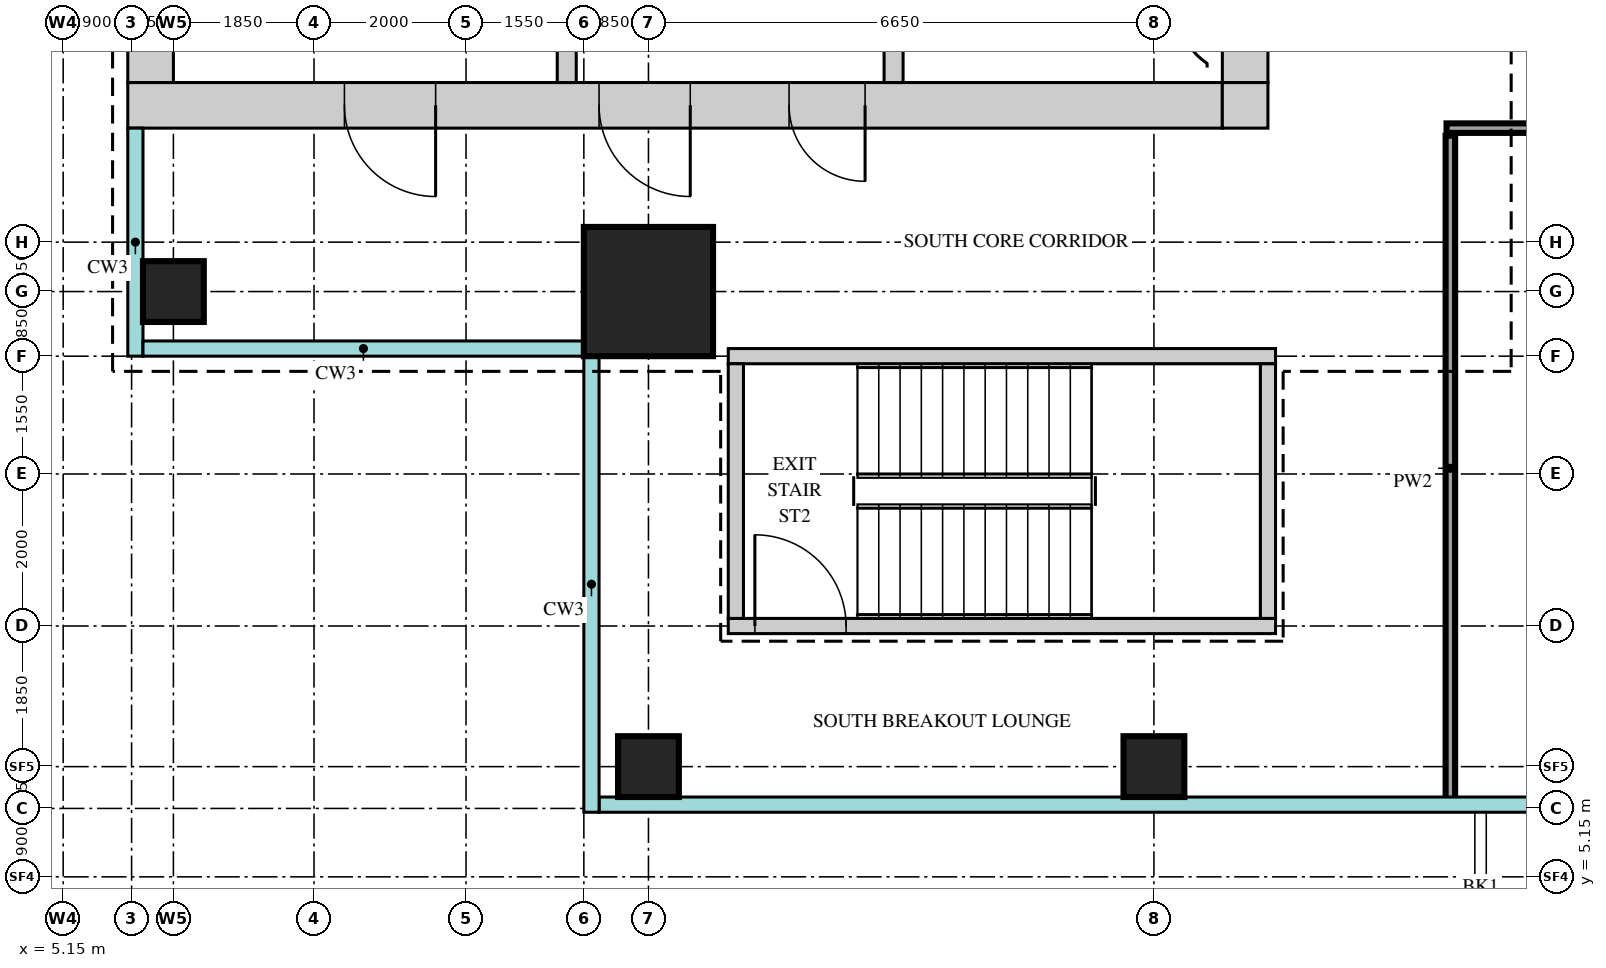
"""IFC4 building model, lengths in metres.
Left out: names, types, materials, properties, quantities, classifications, styles, units other than length and angle.
Written with IfcOpenShell. Run it as: python <this file> out.ifc"""

import sys

from ifc_helpers import new_model, si_unit, direction, frame, frame_2d, origin, origin_2d, place, context, subcontext, project, spatial, rectangle, extrude, source, transform, mapped, element, fill, save


model = new_model("IFC4")
c1 = context("Model", 3, precision=1e-05, world=origin(), true_north=direction((0.0, 1.0)))
c2 = subcontext(c1, "Body", "Model", "MODEL_VIEW")
j1 = project(units=[si_unit("LENGTHUNIT", "METRE"), si_unit("PLANEANGLEUNIT", "RADIAN")], contexts=[c1])
p1 = place(None, origin())
s1 = spatial("IfcSite", under=j1, at=p1, CompositionType="ELEMENT")
p2 = place(p1, origin())
s2 = spatial("IfcBuilding", under=s1, at=p2, CompositionType="ELEMENT")
p3 = place(p2, frame((0.0, 0.0, 302.2)))
s3 = spatial("IfcBuildingStorey", under=s2, at=p3, CompositionType="ELEMENT", Elevation=302.2)
m1 = source(origin(), c2, "Body", "SweptSolid", [
    extrude(rectangle(XDim=14.4, YDim=0.6, at=frame_2d((7.2, 0.0))), origin(), (0.0, 0.0, 1.0), 3.75),
])
p4 = place(p3, frame((6.0, 15.3, 0.0), z_axis=(0.0, 0.0, 1.0), x_axis=(1.0, 0.0, 0.0)))
e1 = element("IfcWall", 1, at=p4, inside=s3, PredefinedType="SHEAR", context=c2, shape_type="MappedRepresentation", body=[
    mapped(m1, transform((0.0, 0.0, 0.0))),
])
m2 = source(origin(), c2, "Body", "SweptSolid", [
    extrude(rectangle(XDim=1.2, YDim=2.1, at=frame_2d((0.6, 1.05))), frame((0.0, 0.31, 0.0), z_axis=(0.0, -1.0, 0.0), x_axis=(1.0, 0.0, 0.0)), (0.0, 0.0, 1.0), 0.62),
])
p5 = place(p4, frame((6.2, 0.0, 0.0)))
e2 = element("IfcOpeningElement", 2, at=p5, cuts=e1, PredefinedType="OPENING", context=c2, shape_type="MappedRepresentation", body=[
    mapped(m2, transform((0.0, 0.0, 0.0))),
])
p6 = place(p4, frame((2.85, 0.0, 0.0)))
e3 = element("IfcOpeningElement", 3, at=p6, cuts=e1, PredefinedType="OPENING", context=c2, shape_type="MappedRepresentation", body=[
    mapped(m2, transform((0.0, 0.0, 0.0))),
])
m3 = source(origin(), c2, "Body", "SweptSolid", [
    extrude(rectangle(XDim=1.0, YDim=2.1, at=frame_2d((0.5, 1.05))), frame((0.0, 0.31, 0.0), z_axis=(0.0, -1.0, 0.0), x_axis=(1.0, 0.0, 0.0)), (0.0, 0.0, 1.0), 0.62),
])
p7 = place(p4, frame((8.7, 0.0, 0.0)))
e4 = element("IfcOpeningElement", 4, at=p7, cuts=e1, PredefinedType="OPENING", context=c2, shape_type="MappedRepresentation", body=[
    mapped(m3, transform((0.0, 0.0, 0.0))),
])
m4 = source(origin(), c2, "Body", "SweptSolid", [
    extrude(rectangle(XDim=0.6, YDim=0.6, at=frame_2d((0.3, 0.0))), origin(), (0.0, 0.0, 1.0), 3.75),
])
p8 = place(p3, frame((20.4, 15.3, 0.0), z_axis=(0.0, 0.0, 1.0), x_axis=(1.0, 0.0, 0.0)))
e5 = element("IfcWall", 5, at=p8, inside=s3, PredefinedType="SHEAR", context=c2, shape_type="MappedRepresentation", body=[
    mapped(m4, transform((0.0, 0.0, 0.0))),
])
m5 = source(origin(), c2, "Body", "SweptSolid", [
    extrude(rectangle(XDim=22.8, YDim=0.6, at=frame_2d((11.4, 0.0))), origin(), (0.0, 0.0, 1.0), 3.75),
])
p9 = place(p3, frame((20.7, 15.6, 0.0), z_axis=(0.0, 0.0, 1.0), x_axis=(0.0, 1.0, 0.0)))
e6 = element("IfcWall", 6, at=p9, inside=s3, PredefinedType="SHEAR", context=c2, shape_type="MappedRepresentation", body=[
    mapped(m5, transform((0.0, 0.0, 0.0))),
])
m6 = source(origin(), c2, "Body", "SweptSolid", [
    extrude(rectangle(XDim=1.8, YDim=2.1, at=frame_2d((0.9, 1.05))), frame((0.0, 0.31, 0.0), z_axis=(0.0, -1.0, 0.0), x_axis=(1.0, 0.0, 0.0)), (0.0, 0.0, 1.0), 0.62),
])
p10 = place(p9, frame((10.9, 0.0, 0.0)))
e7 = element("IfcOpeningElement", 7, at=p10, cuts=e6, PredefinedType="OPENING", context=c2, shape_type="MappedRepresentation", body=[
    mapped(m6, transform((0.0, 0.0, 0.0))),
])
m7 = source(origin(), c2, "Body", "SweptSolid", [
    extrude(rectangle(XDim=0.9, YDim=2.1, at=frame_2d((0.45, 1.05))), frame((0.0, 0.31, 0.0), z_axis=(0.0, -1.0, 0.0), x_axis=(1.0, 0.0, 0.0)), (0.0, 0.0, 1.0), 0.62),
])
p11 = place(p9, frame((0.55, 0.0, 0.0)))
e8 = element("IfcOpeningElement", 8, at=p11, cuts=e6, PredefinedType="OPENING", context=c2, shape_type="MappedRepresentation", body=[
    mapped(m7, transform((0.0, 0.0, 0.0))),
])
p12 = place(p9, frame((4.1, 0.0, 0.0)))
e9 = element("IfcOpeningElement", 9, at=p12, cuts=e6, PredefinedType="OPENING", context=c2, shape_type="MappedRepresentation", body=[
    mapped(m7, transform((0.0, 0.0, 0.0))),
])
p13 = place(p3, frame((6.3, 15.6, 0.0), z_axis=(0.0, 0.0, 1.0), x_axis=(0.0, 1.0, 0.0)))
e10 = element("IfcWall", 10, at=p13, inside=s3, PredefinedType="SHEAR", context=c2, shape_type="MappedRepresentation", body=[
    mapped(m5, transform((0.0, 0.0, 0.0))),
])
m8 = source(origin(), c2, "Body", "SweptSolid", [
    extrude(rectangle(XDim=7.2, YDim=0.2, at=frame_2d((3.6, 0.0))), origin(), (0.0, 0.0, 1.0), 3.75),
])
p14 = place(p3, frame((13.9, 12.0, 0.0), z_axis=(0.0, 0.0, 1.0), x_axis=(1.0, 0.0, 0.0)))
e11 = element("IfcWall", 11, at=p14, inside=s3, PredefinedType="SHEAR", context=c2, shape_type="MappedRepresentation", body=[
    mapped(m8, transform((0.0, 0.0, 0.0))),
])
p15 = place(p3, frame((13.9, 8.45, 0.0), z_axis=(0.0, 0.0, 1.0), x_axis=(1.0, 0.0, 0.0)))
e12 = element("IfcWall", 12, at=p15, inside=s3, PredefinedType="SHEAR", context=c2, shape_type="MappedRepresentation", body=[
    mapped(m8, transform((0.0, 0.0, 0.0))),
])
m9 = source(origin(), c2, "Body", "SweptSolid", [
    extrude(rectangle(XDim=1.2, YDim=2.1, at=frame_2d((0.6, 1.05))), frame((0.0, 0.11, 0.0), z_axis=(0.0, -1.0, 0.0), x_axis=(1.0, 0.0, 0.0)), (0.0, 0.0, 1.0), 0.22),
])
p16 = place(p15, frame((0.35, 0.0, 0.0)))
e13 = element("IfcOpeningElement", 13, at=p16, cuts=e12, PredefinedType="OPENING", context=c2, shape_type="MappedRepresentation", body=[
    mapped(m9, transform((0.0, 0.0, 0.0))),
])
m10 = source(origin(), c2, "Body", "SweptSolid", [
    extrude(rectangle(XDim=3.35, YDim=0.2, at=frame_2d((1.675, 0.0))), origin(), (0.0, 0.0, 1.0), 3.75),
])
for number, where, z_axis, x_axis in (
    (14, (21.0, 8.55, 0.0), (0.0, 0.0, 1.0), (0.0, 1.0, 0.0)),
    (15, (14.0, 8.55, 0.0), (0.0, 0.0, 1.0), (0.0, 1.0, 0.0)),
):
    element("IfcWall", number, at=place(p3, frame(where, z_axis=z_axis, x_axis=x_axis)), inside=s3, PredefinedType="SHEAR", context=c2, shape_type="MappedRepresentation", body=[
        mapped(m10, transform((0.0, 0.0, 0.0))),
    ])
m11 = source(origin(), c2, "Body", "SweptSolid", [
    extrude(rectangle(XDim=3.6, YDim=0.25, at=frame_2d((1.8, 0.0))), origin(), (0.0, 0.0, 1.0), 3.75),
])
for number, where, z_axis, x_axis in (
    (16, (16.075, 15.6, 0.0), (0.0, 0.0, 1.0), (0.0, 1.0, 0.0)),
    (17, (11.775, 15.6, 0.0), (0.0, 0.0, 1.0), (0.0, 1.0, 0.0)),
):
    element("IfcWall", number, at=place(p3, frame(where, z_axis=z_axis, x_axis=x_axis)), inside=s3, PredefinedType="STANDARD", context=c2, shape_type="MappedRepresentation", body=[
        mapped(m11, transform((0.0, 0.0, 0.0))),
    ])
m12 = source(origin(), c2, "Body", "SweptSolid", [
    extrude(rectangle(XDim=1.7, YDim=1.7, at=origin_2d()), origin(), (0.0, 0.0, 1.0), 3.75),
])
p17 = place(p3, frame((12.85, 12.85, 0.0), z_axis=(0.0, 0.0, 1.0), x_axis=(1.0, 0.0, 0.0)))
e18 = element("IfcColumn", 18, at=p17, inside=s3, PredefinedType="COLUMN", context=c2, shape_type="MappedRepresentation", body=[
    mapped(m12, transform((0.0, 0.0, 0.0))),
])
m13 = source(origin(), c2, "Body", "SweptSolid", [
    extrude(rectangle(XDim=0.8, YDim=0.8, at=origin_2d()), origin(), (0.0, 0.0, 1.0), 3.75),
])
for number, where, z_axis, x_axis in (
    (19, (12.85, 6.6, 0.0), (0.0, 0.0, 1.0), (1.0, 0.0, 0.0)),
    (20, (19.5, 6.6, 0.0), (0.0, 0.0, 1.0), (1.0, 0.0, 0.0)),
    (21, (6.6, 12.85, 0.0), (0.0, 0.0, 1.0), (1.0, 0.0, 0.0)),
):
    element("IfcColumn", number, at=place(p3, frame(where, z_axis=z_axis, x_axis=x_axis)), inside=s3, PredefinedType="COLUMN", context=c2, shape_type="MappedRepresentation", body=[
        mapped(m13, transform((0.0, 0.0, 0.0))),
    ])
m14 = source(origin(), c2, "Body", "SweptSolid", [
    extrude(rectangle(XDim=8.75, YDim=0.125, at=frame_2d((4.375, 0.0))), origin(), (0.0, 0.0, 1.0), 3.8),
])
p18 = place(p3, frame((23.4, 6.15, 0.0), z_axis=(0.0, 0.0, 1.0), x_axis=(0.0, 1.0, 0.0)))
e22 = element("IfcWall", 22, at=p18, inside=s3, PredefinedType="PARTITIONING", context=c2, shape_type="MappedRepresentation", body=[
    mapped(m14, transform((0.0, 0.0, 0.0))),
])
m15 = source(origin(), c2, "Body", "SweptSolid", [
    extrude(rectangle(XDim=19.1, YDim=0.125, at=frame_2d((9.55, 0.0))), origin(), (0.0, 0.0, 1.0), 3.8),
])
p19 = place(p3, frame((23.35, 15.0, 0.0), z_axis=(0.0, 0.0, 1.0), x_axis=(1.0, 0.0, 0.0)))
e23 = element("IfcWall", 23, at=p19, inside=s3, PredefinedType="PARTITIONING", context=c2, shape_type="MappedRepresentation", body=[
    mapped(m15, transform((0.0, 0.0, 0.0))),
])
m16 = source(origin(), c2, "Body", "SweptSolid", [
    extrude(rectangle(XDim=0.9, YDim=2.1, at=frame_2d((0.45, 1.05))), frame((0.0, 0.073, 0.0), z_axis=(0.0, -1.0, 0.0), x_axis=(1.0, 0.0, 0.0)), (0.0, 0.0, 1.0), 0.145),
])
p20 = place(p19, frame((5.3, 0.0, 0.0)))
e24 = element("IfcOpeningElement", 24, at=p20, cuts=e23, PredefinedType="OPENING", context=c2, shape_type="MappedRepresentation", body=[
    mapped(m16, transform((0.0, 0.0, 0.0))),
])
p21 = place(p19, frame((13.3, 0.0, 0.0)))
e25 = element("IfcOpeningElement", 25, at=p21, cuts=e23, PredefinedType="OPENING", context=c2, shape_type="MappedRepresentation", body=[
    mapped(m16, transform((0.0, 0.0, 0.0))),
])
p22 = place(p19, frame((17.95, 0.0, 0.0)))
e26 = element("IfcOpeningElement", 26, at=p22, cuts=e23, PredefinedType="OPENING", context=c2, shape_type="MappedRepresentation", body=[
    mapped(m16, transform((0.0, 0.0, 0.0))),
])
m17 = source(origin(), c2, "Body", "SweptSolid", [
    extrude(rectangle(XDim=1.2, YDim=2.1, at=frame_2d((0.6, 1.05))), frame((0.0, 0.25, 0.0), z_axis=(0.0, -1.0, 0.0), x_axis=(1.0, 0.0, 0.0)), (0.0, 0.0, 1.0), 0.5),
])
p23 = place(p5, origin())
e27 = element("IfcDoor", 27, at=p23, inside=s3, OperationType="SINGLE_SWING_RIGHT", PredefinedType="DOOR", context=c2, shape_type="MappedRepresentation", body=[
    mapped(m17, transform((0.0, 0.0, 0.0))),
])
fill(e2, e27)
p24 = place(p6, origin())
e28 = element("IfcDoor", 28, at=p24, inside=s3, OperationType="SINGLE_SWING_RIGHT", PredefinedType="DOOR", context=c2, shape_type="MappedRepresentation", body=[
    mapped(m17, transform((0.0, 0.0, 0.0))),
])
fill(e3, e28)
m18 = source(origin(), c2, "Body", "SweptSolid", [
    extrude(rectangle(XDim=1.0, YDim=2.1, at=frame_2d((0.5, 1.05))), frame((0.0, 0.25, 0.0), z_axis=(0.0, -1.0, 0.0), x_axis=(1.0, 0.0, 0.0)), (0.0, 0.0, 1.0), 0.5),
])
p25 = place(p7, origin())
e29 = element("IfcDoor", 29, at=p25, inside=s3, OperationType="SINGLE_SWING_RIGHT", PredefinedType="DOOR", context=c2, shape_type="MappedRepresentation", body=[
    mapped(m18, transform((0.0, 0.0, 0.0))),
])
fill(e4, e29)
m19 = source(origin(), c2, "Body", "SweptSolid", [
    extrude(rectangle(XDim=1.2, YDim=2.1, at=frame_2d((0.6, 1.05))), frame((0.0, 0.025, 0.0), z_axis=(0.0, -1.0, 0.0), x_axis=(1.0, 0.0, 0.0)), (0.0, 0.0, 1.0), 0.05),
])
p26 = place(p16, origin())
e30 = element("IfcDoor", 30, at=p26, inside=s3, OperationType="SINGLE_SWING_RIGHT", PredefinedType="DOOR", context=c2, shape_type="MappedRepresentation", body=[
    mapped(m19, transform((0.0, 0.0, 0.0))),
])
fill(e13, e30)
save(model, sys.argv[1])
